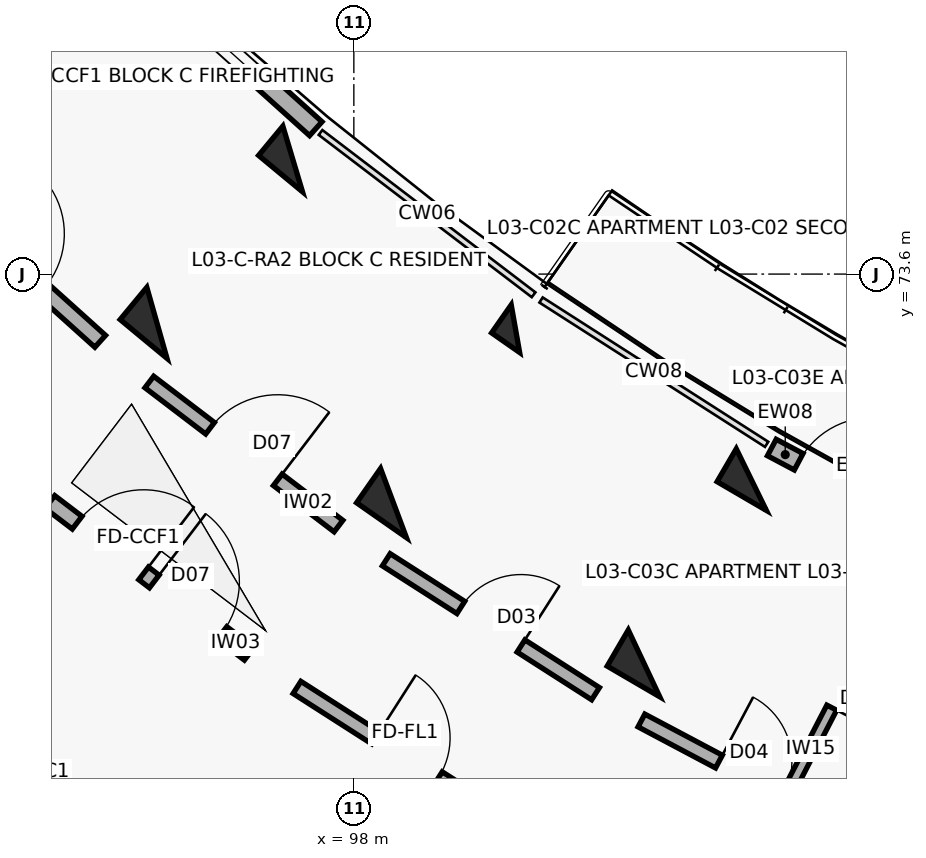
"""IFC4 building model, lengths in metres.
Left out: names, types, materials, properties, quantities, classifications, styles, units other than length and angle.
Written with IfcOpenShell. Run it as: python <this file> out.ifc"""

import sys

from ifc_helpers import new_model, si_unit, direction, frame, frame_2d, origin, origin_2d, place, context, subcontext, project, spatial, rectangle, extrude, element, fill, save


model = new_model("IFC4")
c1 = context("Model", 3, precision=1e-05, world=origin(), true_north=direction((0.0, 1.0)))
c2 = subcontext(c1, "Body", "Model", "MODEL_VIEW")
j1 = project(units=[si_unit("LENGTHUNIT", "METRE"), si_unit("PLANEANGLEUNIT", "RADIAN")], contexts=[c1])
p1 = place(None, origin())
s1 = spatial("IfcSite", under=j1, at=p1, CompositionType="ELEMENT")
p2 = place(p1, origin())
s2 = spatial("IfcBuilding", under=s1, at=p2, CompositionType="ELEMENT")
p3 = place(p2, frame((0.0, 0.0, 11.2)))
s3 = spatial("IfcBuildingStorey", under=s2, at=p3, CompositionType="ELEMENT", Elevation=11.2)
p4 = place(p3, frame((97.195, 75.115, 0.0), z_axis=(0.0, 0.0, 1.0), x_axis=(-0.637961754089, -0.770068049148, 0.0)))
e1 = element("IfcColumn", 1, at=p4, inside=s3, PredefinedType="COLUMN", context=c2, shape_type="SweptSolid", body=[
    extrude(rectangle(XDim=0.5, YDim=0.75, at=origin_2d()), origin(), (0.0, 0.0, 1.0), 3.1),
])
p5 = place(p3, frame((95.409, 72.958, 0.0), z_axis=(0.0, 0.0, 1.0), x_axis=(-0.637961754089, -0.770068049148, 0.0)))
e2 = element("IfcColumn", 2, at=p5, inside=s3, PredefinedType="COLUMN", context=c2, shape_type="SweptSolid", body=[
    extrude(rectangle(XDim=0.55, YDim=0.8, at=origin_2d()), origin(), (0.0, 0.0, 1.0), 3.1),
])
p6 = place(p3, frame((100.126, 72.882, 0.0), z_axis=(0.0, 0.0, 1.0), x_axis=(-0.573004420611, -0.819552276527, 0.0)))
e3 = element("IfcColumn", 3, at=p6, inside=s3, PredefinedType="COLUMN", context=c2, shape_type="SweptSolid", body=[
    extrude(rectangle(XDim=0.45, YDim=0.45, at=origin_2d()), origin(), (0.0, 0.0, 1.0), 3.1),
])
p7 = place(p3, frame((98.522, 70.587, 0.0), z_axis=(0.0, 0.0, 1.0), x_axis=(-0.573004420611, -0.819552276527, 0.0)))
e4 = element("IfcColumn", 4, at=p7, inside=s3, PredefinedType="COLUMN", context=c2, shape_type="SweptSolid", body=[
    extrude(rectangle(XDim=0.55, YDim=0.8, at=origin_2d()), origin(), (0.0, 0.0, 1.0), 3.1),
])
p8 = place(p3, frame((103.229, 70.896, 0.0), z_axis=(0.0, 0.0, 1.0), x_axis=(-0.504226211181, -0.863571611366, 0.0)))
e5 = element("IfcColumn", 5, at=p8, inside=s3, PredefinedType="COLUMN", context=c2, shape_type="SweptSolid", body=[
    extrude(rectangle(XDim=0.5, YDim=0.75, at=origin_2d()), origin(), (0.0, 0.0, 1.0), 3.1),
])
p9 = place(p3, frame((101.817, 68.478, 0.0), z_axis=(0.0, 0.0, 1.0), x_axis=(-0.504226211181, -0.863571611366, 0.0)))
e6 = element("IfcColumn", 6, at=p9, inside=s3, PredefinedType="COLUMN", context=c2, shape_type="SweptSolid", body=[
    extrude(rectangle(XDim=0.55, YDim=0.8, at=origin_2d()), origin(), (0.0, 0.0, 1.0), 3.1),
])
p10 = place(p3, frame((94.82, 77.923, 0.0), z_axis=(0.0, 0.0, 1.0), x_axis=(0.743385092197, -0.668863666751, 0.0)))
e7 = element("IfcWall", 7, at=p10, inside=s3, PredefinedType="SOLIDWALL", context=c2, shape_type="SweptSolid", body=[
    extrude(rectangle(XDim=3.604, YDim=0.245, at=frame_2d((1.802, 0.0))), origin(), (0.0, 0.0, 1.0), 2.25),
])
p11 = place(p10, frame((1.002, 0.0, 0.32)))
e8 = element("IfcOpeningElement", 8, at=p11, cuts=e7, PredefinedType="OPENING", context=c2, shape_type="SweptSolid", body=[
    extrude(rectangle(XDim=1.6, YDim=1.5, at=frame_2d((0.8, 0.75))), frame((0.0, 0.133, 0.0), z_axis=(0.0, -1.0, 0.0), x_axis=(1.0, 0.0, 0.0)), (0.0, 0.0, 1.0), 0.265),
])
p12 = place(p3, frame((103.499, 71.318, 0.0), z_axis=(0.0, 0.0, 1.0), x_axis=(0.883438308286, -0.468547495407, 0.0)))
e9 = element("IfcWall", 9, at=p12, inside=s3, PredefinedType="SOLIDWALL", context=c2, shape_type="SweptSolid", body=[
    extrude(rectangle(XDim=3.604, YDim=0.245, at=frame_2d((1.802, 0.0))), origin(), (0.0, 0.0, 1.0), 2.25),
])
p13 = place(p12, frame((0.4, 0.0, 0.0)))
e10 = element("IfcOpeningElement", 10, at=p13, cuts=e9, PredefinedType="OPENING", context=c2, shape_type="SweptSolid", body=[
    extrude(rectangle(XDim=1.1, YDim=2.15, at=frame_2d((0.55, 1.075))), frame((0.0, 0.133, 0.0), z_axis=(0.0, -1.0, 0.0), x_axis=(1.0, 0.0, 0.0)), (0.0, 0.0, 1.0), 0.265),
])
p14 = place(p12, frame((1.754, 0.0, 0.35)))
e11 = element("IfcOpeningElement", 11, at=p14, cuts=e9, PredefinedType="OPENING", context=c2, shape_type="SweptSolid", body=[
    extrude(rectangle(XDim=1.5, YDim=1.65, at=frame_2d((0.75, 0.825))), frame((0.0, 0.133, 0.0), z_axis=(0.0, -1.0, 0.0), x_axis=(1.0, 0.0, 0.0)), (0.0, 0.0, 1.0), 0.265),
])
p15 = place(p3, frame((92.337, 74.808, 0.0), z_axis=(0.0, 0.0, 1.0), x_axis=(0.743348465558, -0.668904371904, 0.0)))
e12 = element("IfcWall", 12, at=p15, inside=s3, PredefinedType="SOLIDWALL", context=c2, shape_type="SweptSolid", body=[
    extrude(rectangle(XDim=3.129, YDim=0.21, at=frame_2d((1.564, 0.0))), origin(), (0.0, 0.0, 1.0), 2.08),
])
p16 = place(p15, frame((1.014, 0.0, 0.0)))
e13 = element("IfcOpeningElement", 13, at=p16, cuts=e12, PredefinedType="OPENING", context=c2, shape_type="SweptSolid", body=[
    extrude(rectangle(XDim=1.1, YDim=2.15, at=frame_2d((0.55, 1.075))), frame((0.0, 0.115, 0.0), z_axis=(0.0, -1.0, 0.0), x_axis=(1.0, 0.0, 0.0)), (0.0, 0.0, 1.0), 0.23),
])
p17 = place(p3, frame((94.001, 70.602, 0.0), z_axis=(0.0, 0.0, 1.0), x_axis=(0.795498026433, -0.605956178235, 0.0)))
e14 = element("IfcWall", 14, at=p17, inside=s3, PredefinedType="SOLIDWALL", context=c2, shape_type="SweptSolid", body=[
    extrude(rectangle(XDim=3.296, YDim=0.21, at=frame_2d((1.648, 0.0))), origin(), (0.0, 0.0, 1.0), 2.08),
])
p18 = place(p17, frame((0.45, 0.0, 0.0)))
e15 = element("IfcOpeningElement", 15, at=p18, cuts=e14, PredefinedType="OPENING", context=c2, shape_type="SweptSolid", body=[
    extrude(rectangle(XDim=1.1, YDim=2.15, at=frame_2d((0.55, 1.075))), frame((0.0, 0.115, 0.0), z_axis=(0.0, -1.0, 0.0), x_axis=(1.0, 0.0, 0.0)), (0.0, 0.0, 1.0), 0.23),
])
p19 = place(p17, frame((1.726, 0.0, 0.0)))
e16 = element("IfcOpeningElement", 16, at=p19, cuts=e14, PredefinedType="OPENING", context=c2, shape_type="SweptSolid", body=[
    extrude(rectangle(XDim=1.12, YDim=2.15, at=frame_2d((0.56, 1.075))), frame((0.0, 0.115, 0.0), z_axis=(0.0, -1.0, 0.0), x_axis=(1.0, 0.0, 0.0)), (0.0, 0.0, 1.0), 0.23),
])
p20 = place(p3, frame((95.309, 72.18, 0.0), z_axis=(0.0, 0.0, 1.0), x_axis=(0.795463961918, -0.606000895453, 0.0)))
e17 = element("IfcWall", 17, at=p20, inside=s3, PredefinedType="SOLIDWALL", context=c2, shape_type="SweptSolid", body=[
    extrude(rectangle(XDim=3.129, YDim=0.19, at=frame_2d((1.564, 0.0))), origin(), (0.0, 0.0, 1.0), 2.08),
])
p21 = place(p20, frame((1.004, 0.0, 0.0)))
e18 = element("IfcOpeningElement", 18, at=p21, cuts=e17, PredefinedType="OPENING", context=c2, shape_type="SweptSolid", body=[
    extrude(rectangle(XDim=1.12, YDim=2.15, at=frame_2d((0.56, 1.075))), frame((0.0, 0.105, 0.0), z_axis=(0.0, -1.0, 0.0), x_axis=(1.0, 0.0, 0.0)), (0.0, 0.0, 1.0), 0.21),
])
p22 = place(p3, frame((97.252, 68.161, 0.0), z_axis=(0.0, 0.0, 1.0), x_axis=(0.842289466461, -0.53902546757, 0.0)))
e19 = element("IfcWall", 19, at=p22, inside=s3, PredefinedType="SOLIDWALL", context=c2, shape_type="SweptSolid", body=[
    extrude(rectangle(XDim=3.436, YDim=0.19, at=frame_2d((1.718, 0.0))), origin(), (0.0, 0.0, 1.0), 2.08),
])
p23 = place(p22, frame((1.228, 0.0, 0.0)))
e20 = element("IfcOpeningElement", 20, at=p23, cuts=e19, PredefinedType="OPENING", context=c2, shape_type="SweptSolid", body=[
    extrude(rectangle(XDim=0.98, YDim=2.15, at=frame_2d((0.49, 1.075))), frame((0.0, 0.105, 0.0), z_axis=(0.0, -1.0, 0.0), x_axis=(1.0, 0.0, 0.0)), (0.0, 0.0, 1.0), 0.21),
])
p24 = place(p3, frame((98.427, 69.841, 0.0), z_axis=(0.0, 0.0, 1.0), x_axis=(0.842280895761, -0.539038860043, 0.0)))
e21 = element("IfcWall", 21, at=p24, inside=s3, PredefinedType="SOLIDWALL", context=c2, shape_type="SweptSolid", body=[
    extrude(rectangle(XDim=3.269, YDim=0.19, at=frame_2d((1.634, 0.0))), origin(), (0.0, 0.0, 1.0), 2.08),
])
p25 = place(p24, frame((1.164, 0.0, 0.0)))
e22 = element("IfcOpeningElement", 22, at=p25, cuts=e21, PredefinedType="OPENING", context=c2, shape_type="SweptSolid", body=[
    extrude(rectangle(XDim=0.94, YDim=2.1, at=frame_2d((0.47, 1.05))), frame((0.0, 0.105, 0.0), z_axis=(0.0, -1.0, 0.0), x_axis=(1.0, 0.0, 0.0)), (0.0, 0.0, 1.0), 0.21),
])
p26 = place(p3, frame((101.784, 67.726, 0.0), z_axis=(0.0, 0.0, 1.0), x_axis=(0.883444301944, -0.468536194293, 0.0)))
e23 = element("IfcWall", 23, at=p26, inside=s3, PredefinedType="SOLIDWALL", context=c2, shape_type="SweptSolid", body=[
    extrude(rectangle(XDim=3.269, YDim=0.19, at=frame_2d((1.634, 0.0))), origin(), (0.0, 0.0, 1.0), 2.08),
])
p27 = place(p26, frame((1.154, 0.0, 0.0)))
e24 = element("IfcOpeningElement", 24, at=p27, cuts=e23, PredefinedType="OPENING", context=c2, shape_type="SweptSolid", body=[
    extrude(rectangle(XDim=0.96, YDim=2.1, at=frame_2d((0.48, 1.05))), frame((0.0, 0.105, 0.0), z_axis=(0.0, -1.0, 0.0), x_axis=(1.0, 0.0, 0.0)), (0.0, 0.0, 1.0), 0.21),
])
p28 = place(p3, frame((105.247, 69.752, 0.0), z_axis=(0.0, 0.0, 1.0), x_axis=(-0.459187433099, -0.888339406581, 0.0)))
e25 = element("IfcWall", 25, at=p28, inside=s3, PredefinedType="PARTITIONING", context=c2, shape_type="SweptSolid", body=[
    extrude(rectangle(XDim=3.3, YDim=0.145, at=frame_2d((1.65, 0.0))), origin(), (0.0, 0.0, 1.0), 2.08),
])
p29 = place(p28, frame((1.21, 0.0, 0.0)))
e26 = element("IfcOpeningElement", 26, at=p29, cuts=e25, PredefinedType="OPENING", context=c2, shape_type="SweptSolid", body=[
    extrude(rectangle(XDim=0.88, YDim=2.1, at=frame_2d((0.44, 1.05))), frame((0.0, 0.083, 0.0), z_axis=(0.0, -1.0, 0.0), x_axis=(1.0, 0.0, 0.0)), (0.0, 0.0, 1.0), 0.165),
])
p30 = place(p11, origin())
e27 = element("IfcWindow", 27, at=p30, inside=s3, PartitioningType="DOUBLE_PANEL_VERTICAL", PredefinedType="WINDOW", context=c2, shape_type="SweptSolid", body=[
    extrude(rectangle(XDim=1.6, YDim=1.5, at=frame_2d((0.8, 0.75))), frame((0.0, 0.03, 0.0), z_axis=(0.0, -1.0, 0.0), x_axis=(1.0, 0.0, 0.0)), (0.0, 0.0, 1.0), 0.06),
])
fill(e8, e27)
p31 = place(p13, origin())
e28 = element("IfcDoor", 28, at=p31, inside=s3, OperationType="SINGLE_SWING_RIGHT", PredefinedType="DOOR", context=c2, shape_type="SweptSolid", body=[
    extrude(rectangle(XDim=1.1, YDim=2.15, at=frame_2d((0.55, 1.075))), frame((0.0, 0.025, 0.0), z_axis=(0.0, -1.0, 0.0), x_axis=(1.0, 0.0, 0.0)), (0.0, 0.0, 1.0), 0.05),
])
fill(e10, e28)
p32 = place(p18, origin())
e29 = element("IfcDoor", 29, at=p32, inside=s3, OperationType="SINGLE_SWING_RIGHT", PredefinedType="DOOR", context=c2, shape_type="SweptSolid", body=[
    extrude(rectangle(XDim=1.1, YDim=2.15, at=frame_2d((0.55, 1.075))), frame((0.0, 0.025, 0.0), z_axis=(0.0, -1.0, 0.0), x_axis=(1.0, 0.0, 0.0)), (0.0, 0.0, 1.0), 0.05),
])
fill(e15, e29)
p33 = place(p19, origin())
e30 = element("IfcDoor", 30, at=p33, inside=s3, OperationType="SINGLE_SWING_LEFT", PredefinedType="DOOR", context=c2, shape_type="SweptSolid", body=[
    extrude(rectangle(XDim=1.12, YDim=2.15, at=frame_2d((0.56, 1.075))), frame((0.0, 0.025, 0.0), z_axis=(0.0, -1.0, 0.0), x_axis=(1.0, 0.0, 0.0)), (0.0, 0.0, 1.0), 0.05),
])
fill(e16, e30)
p34 = place(p21, origin())
e31 = element("IfcDoor", 31, at=p34, inside=s3, OperationType="SINGLE_SWING_RIGHT", PredefinedType="DOOR", context=c2, shape_type="SweptSolid", body=[
    extrude(rectangle(XDim=1.12, YDim=2.15, at=frame_2d((0.56, 1.075))), frame((0.0, 0.025, 0.0), z_axis=(0.0, -1.0, 0.0), x_axis=(1.0, 0.0, 0.0)), (0.0, 0.0, 1.0), 0.05),
])
fill(e18, e31)
p35 = place(p23, origin())
e32 = element("IfcDoor", 32, at=p35, inside=s3, OperationType="SINGLE_SWING_LEFT", PredefinedType="DOOR", context=c2, shape_type="SweptSolid", body=[
    extrude(rectangle(XDim=0.98, YDim=2.15, at=frame_2d((0.49, 1.075))), frame((0.0, 0.025, 0.0), z_axis=(0.0, -1.0, 0.0), x_axis=(1.0, 0.0, 0.0)), (0.0, 0.0, 1.0), 0.05),
])
fill(e20, e32)
p36 = place(p25, origin())
e33 = element("IfcDoor", 33, at=p36, inside=s3, OperationType="SINGLE_SWING_RIGHT", PredefinedType="DOOR", context=c2, shape_type="SweptSolid", body=[
    extrude(rectangle(XDim=0.94, YDim=2.1, at=frame_2d((0.47, 1.05))), frame((0.0, 0.025, 0.0), z_axis=(0.0, -1.0, 0.0), x_axis=(1.0, 0.0, 0.0)), (0.0, 0.0, 1.0), 0.05),
])
fill(e22, e33)
p37 = place(p27, origin())
e34 = element("IfcDoor", 34, at=p37, inside=s3, OperationType="SINGLE_SWING_LEFT", PredefinedType="DOOR", context=c2, shape_type="SweptSolid", body=[
    extrude(rectangle(XDim=0.96, YDim=2.1, at=frame_2d((0.48, 1.05))), frame((0.0, 0.025, 0.0), z_axis=(0.0, -1.0, 0.0), x_axis=(1.0, 0.0, 0.0)), (0.0, 0.0, 1.0), 0.05),
])
fill(e24, e34)
p38 = place(p29, origin())
e35 = element("IfcDoor", 35, at=p38, inside=s3, OperationType="SINGLE_SWING_RIGHT", PredefinedType="DOOR", context=c2, shape_type="SweptSolid", body=[
    extrude(rectangle(XDim=0.88, YDim=2.1, at=frame_2d((0.44, 1.05))), frame((0.0, 0.025, 0.0), z_axis=(0.0, -1.0, 0.0), x_axis=(1.0, 0.0, 0.0)), (0.0, 0.0, 1.0), 0.05),
])
fill(e26, e35)
save(model, sys.argv[1])
